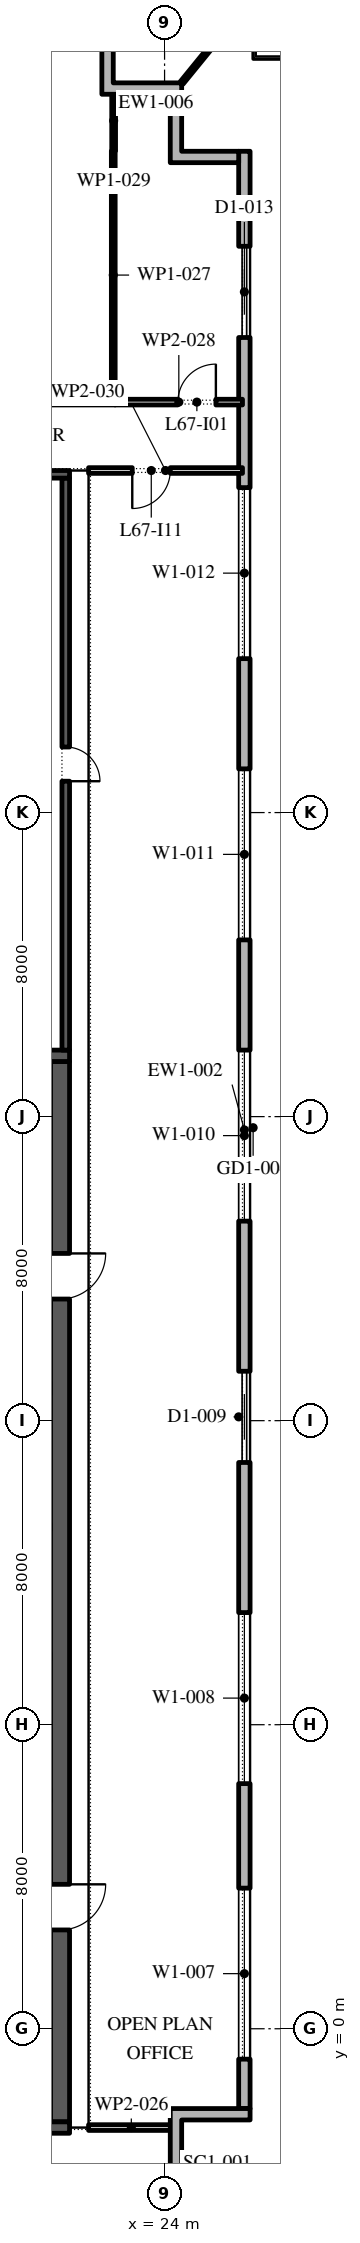
"""IFC4 building model, lengths in metres.
Left out: names, types, materials, properties, quantities, classifications, styles, units other than length and angle.
Written with IfcOpenShell. Run it as: python <this file> out.ifc"""

import sys

from ifc_helpers import new_model, si_unit, direction, frame, frame_2d, origin, place, context, subcontext, project, spatial, polyline, rectangle, outline, extrude, element, fill, save


model = new_model("IFC4")
c1 = context("Model", 3, precision=1e-05, world=origin(), true_north=direction((0.0, 1.0)))
c2 = subcontext(c1, "Body", "Model", "MODEL_VIEW")
j1 = project(units=[si_unit("LENGTHUNIT", "METRE"), si_unit("PLANEANGLEUNIT", "RADIAN")], contexts=[c1])
p1 = place(None, origin())
s1 = spatial("IfcSite", under=j1, at=p1, CompositionType="ELEMENT")
p2 = place(p1, origin())
s2 = spatial("IfcBuilding", under=s1, at=p2, CompositionType="ELEMENT")
p3 = place(p2, frame((0.0, 0.0, 309.0)))
s3 = spatial("IfcBuildingStorey", under=s2, at=p3, CompositionType="ELEMENT", Elevation=309.0)
p4 = place(p3, frame((26.1, -2.1, 0.0), z_axis=(0.0, 0.0, 1.0), x_axis=(0.0, 1.0, 0.0)))
e1 = element("IfcWall", 1, at=p4, inside=s3, PredefinedType="STANDARD", context=c2, shape_type="SweptSolid", body=[
    extrude(rectangle(XDim=51.5, YDim=0.3, at=frame_2d((25.75, 0.0))), origin(), (0.0, 0.0, 1.0), 4.0),
])
p5 = place(p4, frame((1.3, 0.0, 0.45)))
e2 = element("IfcOpeningElement", 2, at=p5, cuts=e1, PredefinedType="OPENING", context=c2, shape_type="SweptSolid", body=[
    extrude(rectangle(XDim=4.5, YDim=3.05, at=frame_2d((2.25, 1.525))), frame((0.0, 0.16, 0.0), z_axis=(0.0, -1.0, 0.0), x_axis=(1.0, 0.0, 0.0)), (0.0, 0.0, 1.0), 0.32),
])
p6 = place(p4, frame((8.55, 0.0, 0.45)))
e3 = element("IfcOpeningElement", 3, at=p6, cuts=e1, PredefinedType="OPENING", context=c2, shape_type="SweptSolid", body=[
    extrude(rectangle(XDim=4.5, YDim=3.05, at=frame_2d((2.25, 1.525))), frame((0.0, 0.16, 0.0), z_axis=(0.0, -1.0, 0.0), x_axis=(1.0, 0.0, 0.0)), (0.0, 0.0, 1.0), 0.32),
])
p7 = place(p4, frame((17.0, 0.0, 0.0)))
e4 = element("IfcOpeningElement", 4, at=p7, cuts=e1, PredefinedType="OPENING", context=c2, shape_type="SweptSolid", body=[
    extrude(rectangle(XDim=2.4, YDim=3.5, at=frame_2d((1.2, 1.75))), frame((0.0, 0.16, 0.0), z_axis=(0.0, -1.0, 0.0), x_axis=(1.0, 0.0, 0.0)), (0.0, 0.0, 1.0), 0.32),
])
p8 = place(p4, frame((23.35, 0.0, 0.45)))
e5 = element("IfcOpeningElement", 5, at=p8, cuts=e1, PredefinedType="OPENING", context=c2, shape_type="SweptSolid", body=[
    extrude(rectangle(XDim=4.5, YDim=3.05, at=frame_2d((2.25, 1.525))), frame((0.0, 0.16, 0.0), z_axis=(0.0, -1.0, 0.0), x_axis=(1.0, 0.0, 0.0)), (0.0, 0.0, 1.0), 0.32),
])
p9 = place(p4, frame((30.75, 0.0, 0.45)))
e6 = element("IfcOpeningElement", 6, at=p9, cuts=e1, PredefinedType="OPENING", context=c2, shape_type="SweptSolid", body=[
    extrude(rectangle(XDim=4.5, YDim=3.05, at=frame_2d((2.25, 1.525))), frame((0.0, 0.16, 0.0), z_axis=(0.0, -1.0, 0.0), x_axis=(1.0, 0.0, 0.0)), (0.0, 0.0, 1.0), 0.32),
])
p10 = place(p4, frame((38.15, 0.0, 0.45)))
e7 = element("IfcOpeningElement", 7, at=p10, cuts=e1, PredefinedType="OPENING", context=c2, shape_type="SweptSolid", body=[
    extrude(rectangle(XDim=4.5, YDim=3.05, at=frame_2d((2.25, 1.525))), frame((0.0, 0.16, 0.0), z_axis=(0.0, -1.0, 0.0), x_axis=(1.0, 0.0, 0.0)), (0.0, 0.0, 1.0), 0.32),
])
p11 = place(p4, frame((46.6, 0.0, 0.0)))
e8 = element("IfcOpeningElement", 8, at=p11, cuts=e1, PredefinedType="OPENING", context=c2, shape_type="SweptSolid", body=[
    extrude(rectangle(XDim=2.4, YDim=3.5, at=frame_2d((1.2, 1.75))), frame((0.0, 0.16, 0.0), z_axis=(0.0, -1.0, 0.0), x_axis=(1.0, 0.0, 0.0)), (0.0, 0.0, 1.0), 0.32),
])
p12 = place(p3, origin())
e9 = element("IfcWall", 9, at=p12, inside=s3, PredefinedType="STANDARD", context=c2, shape_type="SweptSolid", body=[
    extrude(outline(polyline([(24.15, -3.9), (24.15, -2.1), (26.25, -2.1), (26.25, -2.4), (24.45, -2.4), (24.45, -4.2), (22.65, -4.2), (22.65, -5.7), (22.35, -5.7), (22.35, -3.9), (24.15, -3.9)])), origin(), (0.0, 0.0, 1.0), 4.0),
])
p13 = place(p3, origin())
e10 = element("IfcWall", 10, at=p13, inside=s3, PredefinedType="STANDARD", context=c2, shape_type="SweptSolid", body=[
    extrude(outline(polyline([(24.15, 50.9), (22.35, 50.9), (22.35, 53.0), (22.65, 53.0), (22.65, 51.2), (24.45, 51.2), (24.45, 49.4), (25.95, 49.4), (25.95, 49.1), (24.15, 49.1), (24.15, 50.9)])), origin(), (0.0, 0.0, 1.0), 4.0),
])
p14 = place(p3, frame((24.45, 51.2, -0.05), z_axis=(0.0, 0.0, 1.0), x_axis=(0.631657032083, 0.775247956347, 0.0)))
e11 = element("IfcWall", 11, at=p14, inside=s3, PredefinedType="STANDARD", context=c2, shape_type="SweptSolid", body=[
    extrude(rectangle(XDim=3.072, YDim=0.1, at=frame_2d((1.536, 0.0))), origin(), (0.0, 0.0, 1.0), 4.05),
])
p15 = place(p3, frame((21.25, -2.45, 0.0), z_axis=(0.0, 0.0, 1.0), x_axis=(0.0, 1.0, 0.0)))
e12 = element("IfcWall", 12, at=p15, inside=s3, PredefinedType="SHEAR", context=c2, shape_type="SweptSolid", body=[
    extrude(rectangle(XDim=27.9, YDim=0.5, at=frame_2d((13.95, 0.0))), origin(), (0.0, 0.0, 1.0), 4.0),
])
p16 = place(p15, frame((5.05, 0.0, 0.0)))
e13 = element("IfcOpeningElement", 13, at=p16, cuts=e12, PredefinedType="OPENING", context=c2, shape_type="SweptSolid", body=[
    extrude(rectangle(XDim=1.2, YDim=2.1, at=frame_2d((0.6, 1.05))), frame((0.0, 0.26, 0.0), z_axis=(0.0, -1.0, 0.0), x_axis=(1.0, 0.0, 0.0)), (0.0, 0.0, 1.0), 0.52),
])
p17 = place(p15, frame((21.65, 0.0, 0.0)))
e14 = element("IfcOpeningElement", 14, at=p17, cuts=e12, PredefinedType="OPENING", context=c2, shape_type="SweptSolid", body=[
    extrude(rectangle(XDim=1.2, YDim=2.1, at=frame_2d((0.6, 1.05))), frame((0.0, 0.26, 0.0), z_axis=(0.0, -1.0, 0.0), x_axis=(1.0, 0.0, 0.0)), (0.0, 0.0, 1.0), 0.52),
])
for number, where, z_axis, x_axis in (
    (15, (10.5, -2.6, 0.0), (0.0, 0.0, 1.0), (1.0, 0.0, 0.0)),
    (16, (10.5, 25.6, 0.0), (0.0, 0.0, 1.0), (1.0, 0.0, 0.0)),
):
    element("IfcWall", number, at=place(p3, frame(where, z_axis=z_axis, x_axis=x_axis)), inside=s3, PredefinedType="SHEAR", context=c2, shape_type="SweptSolid", body=[
        extrude(rectangle(XDim=11.0, YDim=0.3, at=frame_2d((5.5, 0.0))), origin(), (0.0, 0.0, 1.0), 4.0),
    ])
p18 = place(p3, frame((21.4, 25.75, 0.0), z_axis=(0.0, 0.0, 1.0), x_axis=(0.0, 1.0, 0.0)))
e17 = element("IfcWall", 17, at=p18, inside=s3, PredefinedType="SHEAR", context=c2, shape_type="SweptSolid", body=[
    extrude(rectangle(XDim=15.05, YDim=0.2, at=frame_2d((7.525, 0.0))), origin(), (0.0, 0.0, 1.0), 4.0),
])
p19 = place(p18, frame((7.075, 0.0, 0.0)))
e18 = element("IfcOpeningElement", 18, at=p19, cuts=e17, PredefinedType="OPENING", context=c2, shape_type="SweptSolid", body=[
    extrude(rectangle(XDim=0.9, YDim=2.1, at=frame_2d((0.45, 1.05))), frame((0.0, 0.11, 0.0), z_axis=(0.0, -1.0, 0.0), x_axis=(1.0, 0.0, 0.0)), (0.0, 0.0, 1.0), 0.22),
])
p20 = place(p3, frame((10.5, 40.9, 0.0), z_axis=(0.0, 0.0, 1.0), x_axis=(1.0, 0.0, 0.0)))
e19 = element("IfcWall", 19, at=p20, inside=s3, PredefinedType="SHEAR", context=c2, shape_type="SweptSolid", body=[
    extrude(rectangle(XDim=11.0, YDim=0.2, at=frame_2d((5.5, 0.0))), origin(), (0.0, 0.0, 1.0), 4.0),
])
p21 = place(p3, frame((7.55, 42.8, 0.0), z_axis=(0.0, 0.0, 1.0), x_axis=(1.0, 0.0, 0.0)))
e20 = element("IfcWall", 20, at=p21, inside=s3, PredefinedType="PARTITIONING", context=c2, shape_type="SweptSolid", body=[
    extrude(rectangle(XDim=15.15, YDim=0.15, at=frame_2d((7.575, 0.0))), origin(), (0.0, 0.0, 1.0), 4.0),
])
p22 = place(p21, frame((8.45, 0.0, 0.0)))
e21 = element("IfcOpeningElement", 21, at=p22, cuts=e20, PredefinedType="OPENING", context=c2, shape_type="SweptSolid", body=[
    extrude(rectangle(XDim=1.0, YDim=2.1, at=frame_2d((0.5, 1.05))), frame((0.0, 0.085, 0.0), z_axis=(0.0, -1.0, 0.0), x_axis=(1.0, 0.0, 0.0)), (0.0, 0.0, 1.0), 0.17),
])
p23 = place(p3, frame((22.0, -2.6, 0.0), z_axis=(0.0, 0.0, 1.0), x_axis=(1.0, 0.0, 0.0)))
e22 = element("IfcWall", 22, at=p23, inside=s3, PredefinedType="PARTITIONING", context=c2, shape_type="SweptSolid", body=[
    extrude(rectangle(XDim=2.25, YDim=0.15, at=frame_2d((1.125, 0.0))), origin(), (0.0, 0.0, 1.0), 4.0),
])
p24 = place(p3, frame((22.65, 42.875, 0.0), z_axis=(0.0, 0.0, 1.0), x_axis=(0.0, 1.0, 0.0)))
e23 = element("IfcWall", 23, at=p24, inside=s3, PredefinedType="PARTITIONING", context=c2, shape_type="SweptSolid", body=[
    extrude(rectangle(XDim=6.535, YDim=0.1, at=frame_2d((3.268, 0.0))), origin(), (0.0, 0.0, 1.0), 4.0),
])
p25 = place(p3, frame((22.7, 42.8, 0.0), z_axis=(0.0, 0.0, 1.0), x_axis=(1.0, 0.0, 0.0)))
e24 = element("IfcWall", 24, at=p25, inside=s3, PredefinedType="PARTITIONING", context=c2, shape_type="SweptSolid", body=[
    extrude(rectangle(XDim=3.35, YDim=0.15, at=frame_2d((1.675, 0.0))), origin(), (0.0, 0.0, 1.0), 4.0),
])
p26 = place(p25, frame((1.65, 0.0, 0.0)))
e25 = element("IfcOpeningElement", 25, at=p26, cuts=e24, PredefinedType="OPENING", context=c2, shape_type="SweptSolid", body=[
    extrude(rectangle(XDim=1.0, YDim=2.1, at=frame_2d((0.5, 1.05))), frame((0.0, 0.085, 0.0), z_axis=(0.0, -1.0, 0.0), x_axis=(1.0, 0.0, 0.0)), (0.0, 0.0, 1.0), 0.17),
])
p27 = place(p3, frame((22.66, 49.41, 0.0), z_axis=(0.0, 0.0, 1.0), x_axis=(0.0, 1.0, 0.0)))
e26 = element("IfcWall", 26, at=p27, inside=s3, PredefinedType="PARTITIONING", context=c2, shape_type="SweptSolid", body=[
    extrude(rectangle(XDim=1.59, YDim=0.1, at=frame_2d((0.795, 0.0))), origin(), (0.0, 0.0, 1.0), 4.0),
])
p28 = place(p3, frame((26.05, 41.0, 0.0), z_axis=(0.0, 0.0, 1.0), x_axis=(-1.0, 0.0, 0.0)))
e27 = element("IfcWall", 27, at=p28, inside=s3, PredefinedType="PARTITIONING", context=c2, shape_type="SweptSolid", body=[
    extrude(rectangle(XDim=4.05, YDim=0.15, at=frame_2d((2.025, 0.0))), origin(), (0.0, 0.0, 1.0), 4.0),
])
p29 = place(p28, frame((1.9, 0.0, 0.0)))
e28 = element("IfcOpeningElement", 28, at=p29, cuts=e27, PredefinedType="OPENING", context=c2, shape_type="SweptSolid", body=[
    extrude(rectangle(XDim=1.0, YDim=2.1, at=frame_2d((0.5, 1.05))), frame((0.0, 0.085, 0.0), z_axis=(0.0, -1.0, 0.0), x_axis=(1.0, 0.0, 0.0)), (0.0, 0.0, 1.0), 0.17),
])
p30 = place(p5, origin())
e29 = element("IfcWindow", 29, at=p30, inside=s3, PartitioningType="DOUBLE_PANEL_VERTICAL", PredefinedType="WINDOW", context=c2, shape_type="SweptSolid", body=[
    extrude(rectangle(XDim=4.5, YDim=3.05, at=frame_2d((2.25, 1.525))), frame((0.0, 0.03, 0.0), z_axis=(0.0, -1.0, 0.0), x_axis=(1.0, 0.0, 0.0)), (0.0, 0.0, 1.0), 0.06),
])
fill(e2, e29)
p31 = place(p6, origin())
e30 = element("IfcWindow", 30, at=p31, inside=s3, PartitioningType="DOUBLE_PANEL_VERTICAL", PredefinedType="WINDOW", context=c2, shape_type="SweptSolid", body=[
    extrude(rectangle(XDim=4.5, YDim=3.05, at=frame_2d((2.25, 1.525))), frame((0.0, 0.03, 0.0), z_axis=(0.0, -1.0, 0.0), x_axis=(1.0, 0.0, 0.0)), (0.0, 0.0, 1.0), 0.06),
])
fill(e3, e30)
p32 = place(p7, origin())
e31 = element("IfcDoor", 31, at=p32, inside=s3, OperationType="DOUBLE_DOOR_SLIDING", PredefinedType="DOOR", context=c2, shape_type="SweptSolid", body=[
    extrude(rectangle(XDim=2.4, YDim=3.5, at=frame_2d((1.2, 1.75))), frame((0.0, 0.025, 0.0), z_axis=(0.0, -1.0, 0.0), x_axis=(1.0, 0.0, 0.0)), (0.0, 0.0, 1.0), 0.05),
])
fill(e4, e31)
p33 = place(p8, origin())
e32 = element("IfcWindow", 32, at=p33, inside=s3, PartitioningType="DOUBLE_PANEL_VERTICAL", PredefinedType="WINDOW", context=c2, shape_type="SweptSolid", body=[
    extrude(rectangle(XDim=4.5, YDim=3.05, at=frame_2d((2.25, 1.525))), frame((0.0, 0.03, 0.0), z_axis=(0.0, -1.0, 0.0), x_axis=(1.0, 0.0, 0.0)), (0.0, 0.0, 1.0), 0.06),
])
fill(e5, e32)
p34 = place(p9, origin())
e33 = element("IfcWindow", 33, at=p34, inside=s3, PartitioningType="DOUBLE_PANEL_VERTICAL", PredefinedType="WINDOW", context=c2, shape_type="SweptSolid", body=[
    extrude(rectangle(XDim=4.5, YDim=3.05, at=frame_2d((2.25, 1.525))), frame((0.0, 0.03, 0.0), z_axis=(0.0, -1.0, 0.0), x_axis=(1.0, 0.0, 0.0)), (0.0, 0.0, 1.0), 0.06),
])
fill(e6, e33)
p35 = place(p10, origin())
e34 = element("IfcWindow", 34, at=p35, inside=s3, PartitioningType="DOUBLE_PANEL_VERTICAL", PredefinedType="WINDOW", context=c2, shape_type="SweptSolid", body=[
    extrude(rectangle(XDim=4.5, YDim=3.05, at=frame_2d((2.25, 1.525))), frame((0.0, 0.03, 0.0), z_axis=(0.0, -1.0, 0.0), x_axis=(1.0, 0.0, 0.0)), (0.0, 0.0, 1.0), 0.06),
])
fill(e7, e34)
p36 = place(p11, origin())
e35 = element("IfcDoor", 35, at=p36, inside=s3, OperationType="DOUBLE_DOOR_SLIDING", PredefinedType="DOOR", context=c2, shape_type="SweptSolid", body=[
    extrude(rectangle(XDim=2.4, YDim=3.5, at=frame_2d((1.2, 1.75))), frame((0.0, 0.025, 0.0), z_axis=(0.0, -1.0, 0.0), x_axis=(1.0, 0.0, 0.0)), (0.0, 0.0, 1.0), 0.05),
])
fill(e8, e35)
p37 = place(p16, frame((1.2, 0.0, 0.0), z_axis=(0.0, 0.0, 1.0), x_axis=(-1.0, 0.0, 0.0)))
e36 = element("IfcDoor", 36, at=p37, inside=s3, OperationType="SINGLE_SWING_RIGHT", PredefinedType="DOOR", context=c2, shape_type="SweptSolid", body=[
    extrude(rectangle(XDim=1.2, YDim=2.1, at=frame_2d((0.6, 1.05))), frame((0.0, 0.025, 0.0), z_axis=(0.0, -1.0, 0.0), x_axis=(1.0, 0.0, 0.0)), (0.0, 0.0, 1.0), 0.05),
])
fill(e13, e36)
p38 = place(p17, frame((1.2, 0.0, 0.0), z_axis=(0.0, 0.0, 1.0), x_axis=(-1.0, 0.0, 0.0)))
e37 = element("IfcDoor", 37, at=p38, inside=s3, OperationType="SINGLE_SWING_RIGHT", PredefinedType="DOOR", context=c2, shape_type="SweptSolid", body=[
    extrude(rectangle(XDim=1.2, YDim=2.1, at=frame_2d((0.6, 1.05))), frame((0.0, 0.025, 0.0), z_axis=(0.0, -1.0, 0.0), x_axis=(1.0, 0.0, 0.0)), (0.0, 0.0, 1.0), 0.05),
])
fill(e14, e37)
p39 = place(p19, frame((0.9, 0.15, 0.0), z_axis=(0.0, 0.0, 1.0), x_axis=(-1.0, 0.0, 0.0)))
e38 = element("IfcDoor", 38, at=p39, inside=s3, OperationType="SINGLE_SWING_LEFT", PredefinedType="DOOR", context=c2, shape_type="SweptSolid", body=[
    extrude(rectangle(XDim=0.9, YDim=2.1, at=frame_2d((0.45, 1.05))), frame((0.0, 0.1, 0.0), z_axis=(0.0, -1.0, 0.0), x_axis=(1.0, 0.0, 0.0)), (0.0, 0.0, 1.0), 0.05),
])
fill(e18, e38)
p40 = place(p26, origin())
e39 = element("IfcDoor", 39, at=p40, inside=s3, OperationType="SINGLE_SWING_LEFT", PredefinedType="DOOR", context=c2, shape_type="SweptSolid", body=[
    extrude(rectangle(XDim=1.0, YDim=2.1, at=frame_2d((0.5, 1.05))), frame((0.0, 0.025, 0.0), z_axis=(0.0, -1.0, 0.0), x_axis=(1.0, 0.0, 0.0)), (0.0, 0.0, 1.0), 0.05),
])
fill(e25, e39)
p41 = place(p29, origin())
e40 = element("IfcDoor", 40, at=p41, inside=s3, OperationType="SINGLE_SWING_LEFT", PredefinedType="DOOR", context=c2, shape_type="SweptSolid", body=[
    extrude(rectangle(XDim=1.0, YDim=2.1, at=frame_2d((0.5, 1.05))), frame((0.0, 0.025, 0.0), z_axis=(0.0, -1.0, 0.0), x_axis=(1.0, 0.0, 0.0)), (0.0, 0.0, 1.0), 0.05),
])
fill(e28, e40)
save(model, sys.argv[1])
